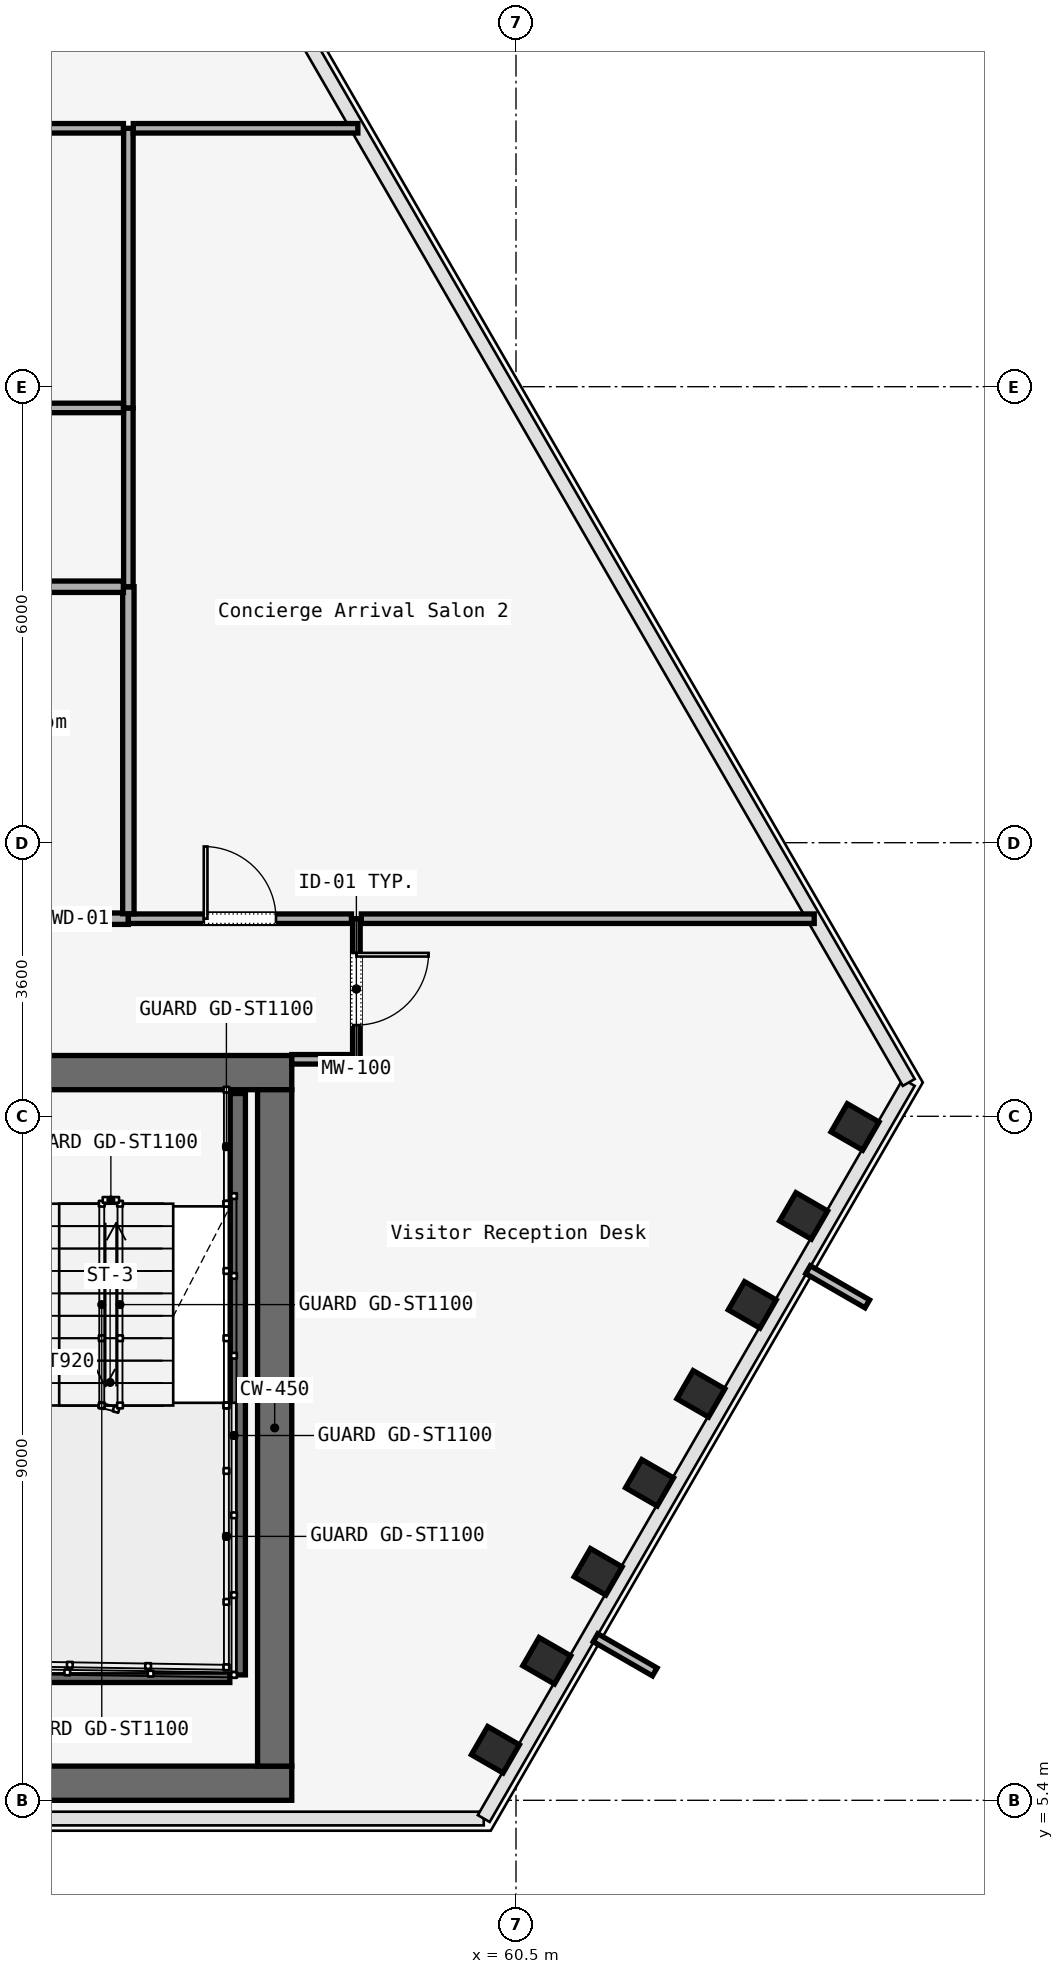
"""IFC4 building model, lengths in metres.
Left out: names, types, materials, properties, quantities, classifications, styles, units other than length and angle.
Written with IfcOpenShell. Run it as: python <this file> out.ifc"""

import sys

from ifc_helpers import new_model, si_unit, direction, frame, frame_2d, origin, origin_2d, place, context, subcontext, project, spatial, rectangle, i_section, extrude, element, fill, save


model = new_model("IFC4")
c1 = context("Model", 3, precision=1e-05, world=origin(), true_north=direction((0.0, 1.0)))
c2 = subcontext(c1, "Body", "Model", "MODEL_VIEW")
j1 = project(units=[si_unit("LENGTHUNIT", "METRE"), si_unit("PLANEANGLEUNIT", "RADIAN")], contexts=[c1])
p1 = place(None, origin())
s1 = spatial("IfcSite", under=j1, at=p1, CompositionType="ELEMENT")
p2 = place(p1, origin())
s2 = spatial("IfcBuilding", under=s1, at=p2, CompositionType="ELEMENT")
p3 = place(p2, frame((0.0, 0.0, 153.6)))
s3 = spatial("IfcBuildingStorey", under=s2, at=p3, CompositionType="ELEMENT", Elevation=153.6)
p4 = place(p3, frame((26.45, 14.975, 0.0), z_axis=(0.0, 0.0, 1.0), x_axis=(1.0, 0.0, 0.0)))
e1 = element("IfcWall", 1, at=p4, inside=s3, PredefinedType="SOLIDWALL", context=c2, shape_type="SweptSolid", body=[
    extrude(rectangle(XDim=31.1, YDim=0.45, at=frame_2d((15.55, 0.0))), origin(), (0.0, 0.0, 1.0), 3.58),
])
p5 = place(p4, frame((1.65, 0.0, 0.0)))
e2 = element("IfcOpeningElement", 2, at=p5, cuts=e1, PredefinedType="OPENING", context=c2, shape_type="SweptSolid", body=[
    extrude(rectangle(XDim=1.1, YDim=2.2, at=frame_2d((0.55, 1.1))), frame((0.0, 0.225, 0.0), z_axis=(0.0, -1.0, 0.0), x_axis=(1.0, 0.0, 0.0)), (0.0, 0.0, 1.0), 0.45),
])
p6 = place(p4, frame((13.65, 0.0, 0.0)))
e3 = element("IfcOpeningElement", 3, at=p6, cuts=e1, PredefinedType="OPENING", context=c2, shape_type="SweptSolid", body=[
    extrude(rectangle(XDim=1.1, YDim=2.2, at=frame_2d((0.55, 1.1))), frame((0.0, 0.225, 0.0), z_axis=(0.0, -1.0, 0.0), x_axis=(1.0, 0.0, 0.0)), (0.0, 0.0, 1.0), 0.45),
])
p7 = place(p4, frame((25.55, 0.0, 0.0)))
e4 = element("IfcOpeningElement", 4, at=p7, cuts=e1, PredefinedType="OPENING", context=c2, shape_type="SweptSolid", body=[
    extrude(rectangle(XDim=1.1, YDim=2.2, at=frame_2d((0.55, 1.1))), frame((0.0, 0.225, 0.0), z_axis=(0.0, -1.0, 0.0), x_axis=(1.0, 0.0, 0.0)), (0.0, 0.0, 1.0), 0.45),
])
p8 = place(p4, frame((10.7, 0.0, 0.0)))
e5 = element("IfcOpeningElement", 5, at=p8, cuts=e1, PredefinedType="OPENING", context=c2, shape_type="SweptSolid", body=[
    extrude(rectangle(XDim=1.4, YDim=2.2, at=frame_2d((0.7, 1.1))), frame((0.0, 0.225, 0.0), z_axis=(0.0, -1.0, 0.0), x_axis=(1.0, 0.0, 0.0)), (0.0, 0.0, 1.0), 0.45),
])
p9 = place(p4, frame((19.35, 0.0, 0.0)))
e6 = element("IfcOpeningElement", 6, at=p9, cuts=e1, PredefinedType="OPENING", context=c2, shape_type="SweptSolid", body=[
    extrude(rectangle(XDim=1.1, YDim=2.2, at=frame_2d((0.55, 1.1))), frame((0.0, 0.225, 0.0), z_axis=(0.0, -1.0, 0.0), x_axis=(1.0, 0.0, 0.0)), (0.0, 0.0, 1.0), 0.45),
])
p10 = place(p4, frame((21.4, 0.0, 0.0)))
e7 = element("IfcOpeningElement", 7, at=p10, cuts=e1, PredefinedType="OPENING", context=c2, shape_type="SweptSolid", body=[
    extrude(rectangle(XDim=0.9, YDim=2.1, at=frame_2d((0.45, 1.05))), frame((0.0, 0.225, 0.0), z_axis=(0.0, -1.0, 0.0), x_axis=(1.0, 0.0, 0.0)), (0.0, 0.0, 1.0), 0.45),
])
p11 = place(p4, frame((23.35, 0.0, 0.0)))
e8 = element("IfcOpeningElement", 8, at=p11, cuts=e1, PredefinedType="OPENING", context=c2, shape_type="SweptSolid", body=[
    extrude(rectangle(XDim=1.3, YDim=2.3, at=frame_2d((0.65, 1.15))), frame((0.0, 0.225, 0.0), z_axis=(0.0, -1.0, 0.0), x_axis=(1.0, 0.0, 0.0)), (0.0, 0.0, 1.0), 0.45),
])
p12 = place(p3, frame((26.45, 5.625, 0.0), z_axis=(0.0, 0.0, 1.0), x_axis=(1.0, 0.0, 0.0)))
e9 = element("IfcWall", 9, at=p12, inside=s3, PredefinedType="SOLIDWALL", context=c2, shape_type="SweptSolid", body=[
    extrude(rectangle(XDim=31.1, YDim=0.45, at=frame_2d((15.55, 0.0))), origin(), (0.0, 0.0, 1.0), 3.58),
])
p13 = place(p3, frame((57.325, 5.85, 0.0), z_axis=(0.0, 0.0, 1.0), x_axis=(0.0, 1.0, 0.0)))
e10 = element("IfcWall", 10, at=p13, inside=s3, PredefinedType="SOLIDWALL", context=c2, shape_type="SweptSolid", body=[
    extrude(rectangle(XDim=8.9, YDim=0.45, at=frame_2d((4.45, 0.0))), origin(), (0.0, 0.0, 1.0), 3.58),
])
for number, where, z_axis, x_axis in (
    (11, (60.229, 6.065, 0.0), (0.0, 0.0, 1.0), (0.5, 0.866, 0.0)),
    (12, (60.905, 7.236, 0.0), (0.0, 0.0, 1.0), (0.5, 0.866, 0.0)),
    (13, (61.581, 8.407, 0.0), (0.0, 0.0, 1.0), (0.5, 0.866, 0.0)),
    (14, (62.257, 9.577, 0.0), (0.0, 0.0, 1.0), (0.5, 0.866, 0.0)),
    (15, (62.933, 10.748, 0.0), (0.0, 0.0, 1.0), (0.5, 0.866, 0.0)),
    (16, (63.608, 11.919, 0.0), (0.0, 0.0, 1.0), (0.5, 0.866, 0.0)),
    (17, (64.284, 13.089, 0.0), (0.0, 0.0, 1.0), (0.5, 0.866, 0.0)),
    (18, (64.96, 14.26, 0.0), (0.0, 0.0, 1.0), (0.5, 0.866, 0.0)),
):
    element("IfcColumn", number, at=place(p3, frame(where, z_axis=z_axis, x_axis=x_axis)), inside=s3, PredefinedType="COLUMN", context=c2, shape_type="SweptSolid", body=[
        extrude(i_section(OverallWidth=0.428, OverallDepth=0.481, WebThickness=0.051, FlangeThickness=0.065, FilletRadius=0.015, at=origin_2d()), origin(), (0.0, 0.0, 1.0), 3.58),
    ])
p14 = place(p3, frame((56.84, 14.7, 0.0), z_axis=(0.0, 0.0, 1.0), x_axis=(0.0, -1.0, 0.0)))
e19 = element("IfcWall", 19, at=p14, inside=s3, PredefinedType="SOLIDWALL", context=c2, shape_type="SweptSolid", body=[
    extrude(rectangle(XDim=7.65, YDim=0.2, at=frame_2d((3.825, 0.0))), origin(), (0.0, 0.0, 1.0), 3.8),
])
p15 = place(p3, frame((53.62, 7.05, 0.0), z_axis=(0.0, 0.0, 1.0), x_axis=(1.0, 0.0, 0.0)))
e20 = element("IfcWall", 20, at=p15, inside=s3, PredefinedType="SOLIDWALL", context=c2, shape_type="SweptSolid", body=[
    extrude(rectangle(XDim=3.115, YDim=0.2, at=frame_2d((1.558, 0.0))), origin(), (0.0, 0.0, 1.0), 3.8),
])
p16 = place(p3, frame((58.4, 17.0, 0.0), z_axis=(0.0, 0.0, 1.0), x_axis=(0.0, -1.0, 0.0)))
e21 = element("IfcWall", 21, at=p16, inside=s3, PredefinedType="MOVABLE", context=c2, shape_type="SweptSolid", body=[
    extrude(rectangle(XDim=1.85, YDim=0.1, at=frame_2d((0.925, 0.0))), origin(), (0.0, 0.0, 1.0), 3.01),
])
p17 = place(p16, frame((0.45, 0.0, 0.0)))
e22 = element("IfcOpeningElement", 22, at=p17, cuts=e21, PredefinedType="OPENING", context=c2, shape_type="SweptSolid", body=[
    extrude(rectangle(XDim=0.95, YDim=2.2, at=frame_2d((0.475, 1.1))), frame((0.0, 0.05, 0.0), z_axis=(0.0, -1.0, 0.0), x_axis=(1.0, 0.0, 0.0)), (0.0, 0.0, 1.0), 0.1),
])
p18 = place(p3, frame((58.335, 15.15, 0.0), z_axis=(0.0, 0.0, 1.0), x_axis=(-1.0, 0.0, 0.0)))
e23 = element("IfcWall", 23, at=p18, inside=s3, PredefinedType="PARTITIONING", context=c2, shape_type="SweptSolid", body=[
    extrude(rectangle(XDim=0.785, YDim=0.125, at=frame_2d((0.393, 0.0))), origin(), (0.0, 0.0, 1.0), 3.01),
])
p19 = place(p3, frame((51.34, 17.0, 0.0), z_axis=(0.0, 0.0, 1.0), x_axis=(1.0, 0.0, 0.0)))
e24 = element("IfcWall", 24, at=p19, inside=s3, PredefinedType="PARTITIONING", context=c2, shape_type="SweptSolid", body=[
    extrude(rectangle(XDim=4.06, YDim=0.15, at=frame_2d((2.03, 0.0))), origin(), (0.0, 0.0, 1.0), 3.01),
])
p20 = place(p19, frame((1.58, 0.0, 0.0)))
e25 = element("IfcOpeningElement", 25, at=p20, cuts=e24, PredefinedType="OPENING", context=c2, shape_type="SweptSolid", body=[
    extrude(rectangle(XDim=0.9, YDim=2.15, at=frame_2d((0.45, 1.075))), frame((0.0, 0.075, 0.0), z_axis=(0.0, -1.0, 0.0), x_axis=(1.0, 0.0, 0.0)), (0.0, 0.0, 1.0), 0.15),
])
p21 = place(p3, frame((55.4, 17.0, 0.0), z_axis=(0.0, 0.0, 1.0), x_axis=(1.0, 0.0, 0.0)))
e26 = element("IfcWall", 26, at=p21, inside=s3, PredefinedType="PARTITIONING", context=c2, shape_type="SweptSolid", body=[
    extrude(rectangle(XDim=2.935, YDim=0.125, at=frame_2d((1.468, 0.0))), origin(), (0.0, 0.0, 1.0), 3.01),
])
p22 = place(p21, frame((0.992, 0.0, 0.0)))
e27 = element("IfcOpeningElement", 27, at=p22, cuts=e26, PredefinedType="OPENING", context=c2, shape_type="SweptSolid", body=[
    extrude(rectangle(XDim=0.95, YDim=2.2, at=frame_2d((0.475, 1.1))), frame((0.0, 0.062, 0.0), z_axis=(0.0, -1.0, 0.0), x_axis=(1.0, 0.0, 0.0)), (0.0, 0.0, 1.0), 0.125),
])
p23 = place(p3, frame((58.465, 17.0, 0.0), z_axis=(0.0, 0.0, 1.0), x_axis=(1.0, 0.0, 0.0)))
e28 = element("IfcWall", 28, at=p23, inside=s3, PredefinedType="PARTITIONING", context=c2, shape_type="SweptSolid", body=[
    extrude(rectangle(XDim=5.959, YDim=0.125, at=frame_2d((2.979, 0.0))), origin(), (0.0, 0.0, 1.0), 3.01),
])
p24 = place(p3, frame((55.4, 21.368, 0.0), z_axis=(0.0, 0.0, 1.0), x_axis=(0.0, -1.0, 0.0)))
e29 = element("IfcWall", 29, at=p24, inside=s3, PredefinedType="PARTITIONING", context=c2, shape_type="SweptSolid", body=[
    extrude(rectangle(XDim=4.303, YDim=0.15, at=frame_2d((2.151, 0.0))), origin(), (0.0, 0.0, 1.0), 3.01),
])
p25 = place(p3, frame((51.34, 21.368, 0.0), z_axis=(0.0, 0.0, 1.0), x_axis=(1.0, 0.0, 0.0)))
e30 = element("IfcWall", 30, at=p25, inside=s3, PredefinedType="PARTITIONING", context=c2, shape_type="SweptSolid", body=[
    extrude(rectangle(XDim=3.995, YDim=0.15, at=frame_2d((1.998, 0.0))), origin(), (0.0, 0.0, 1.0), 3.01),
])
p26 = place(p3, frame((55.4, 21.368, 0.0), z_axis=(0.0, 0.0, 1.0), x_axis=(0.0, 1.0, 0.0)))
e31 = element("IfcWall", 31, at=p26, inside=s3, PredefinedType="PARTITIONING", context=c2, shape_type="SweptSolid", body=[
    extrude(rectangle(XDim=2.353, YDim=0.125, at=frame_2d((1.176, 0.0))), origin(), (0.0, 0.0, 1.0), 3.01),
])
p27 = place(p3, frame((55.4, 23.72, 0.0), z_axis=(0.0, 0.0, 1.0), x_axis=(0.0, 1.0, 0.0)))
e32 = element("IfcWall", 32, at=p27, inside=s3, PredefinedType="PARTITIONING", context=c2, shape_type="SweptSolid", body=[
    extrude(rectangle(XDim=3.679, YDim=0.125, at=frame_2d((1.84, 0.0))), origin(), (0.0, 0.0, 1.0), 3.01),
])
p28 = place(p3, frame((55.465, 27.4, 0.0), z_axis=(0.0, 0.0, 1.0), x_axis=(1.0, 0.0, 0.0)))
e33 = element("IfcWall", 33, at=p28, inside=s3, PredefinedType="PARTITIONING", context=c2, shape_type="SweptSolid", body=[
    extrude(rectangle(XDim=2.954, YDim=0.125, at=frame_2d((1.477, 0.0))), origin(), (0.0, 0.0, 1.0), 3.01),
])
p29 = place(p3, frame((48.465, 23.72, 0.0), z_axis=(0.0, 0.0, 1.0), x_axis=(1.0, 0.0, 0.0)))
e34 = element("IfcWall", 34, at=p29, inside=s3, PredefinedType="PARTITIONING", context=c2, shape_type="SweptSolid", body=[
    extrude(rectangle(XDim=6.87, YDim=0.125, at=frame_2d((3.435, 0.0))), origin(), (0.0, 0.0, 1.0), 3.01),
])
p30 = place(p3, frame((48.4, 27.4, 0.0), z_axis=(0.0, 0.0, 1.0), x_axis=(1.0, 0.0, 0.0)))
e35 = element("IfcWall", 35, at=p30, inside=s3, PredefinedType="PARTITIONING", context=c2, shape_type="SweptSolid", body=[
    extrude(rectangle(XDim=6.935, YDim=0.125, at=frame_2d((3.468, 0.0))), origin(), (0.0, 0.0, 1.0), 3.01),
])
p31 = place(p17, origin())
e36 = element("IfcDoor", 36, at=p31, inside=s3, OperationType="SINGLE_SWING_RIGHT", PredefinedType="DOOR", context=c2, shape_type="SweptSolid", body=[
    extrude(rectangle(XDim=0.95, YDim=2.2, at=frame_2d((0.475, 1.1))), frame((0.0, 0.025, 0.0), z_axis=(0.0, -1.0, 0.0), x_axis=(1.0, 0.0, 0.0)), (0.0, 0.0, 1.0), 0.05),
])
fill(e22, e36)
p32 = place(p22, origin())
e37 = element("IfcDoor", 37, at=p32, inside=s3, OperationType="SINGLE_SWING_RIGHT", PredefinedType="DOOR", context=c2, shape_type="SweptSolid", body=[
    extrude(rectangle(XDim=0.95, YDim=2.2, at=frame_2d((0.475, 1.1))), frame((0.0, 0.025, 0.0), z_axis=(0.0, -1.0, 0.0), x_axis=(1.0, 0.0, 0.0)), (0.0, 0.0, 1.0), 0.05),
])
fill(e27, e37)
save(model, sys.argv[1])
